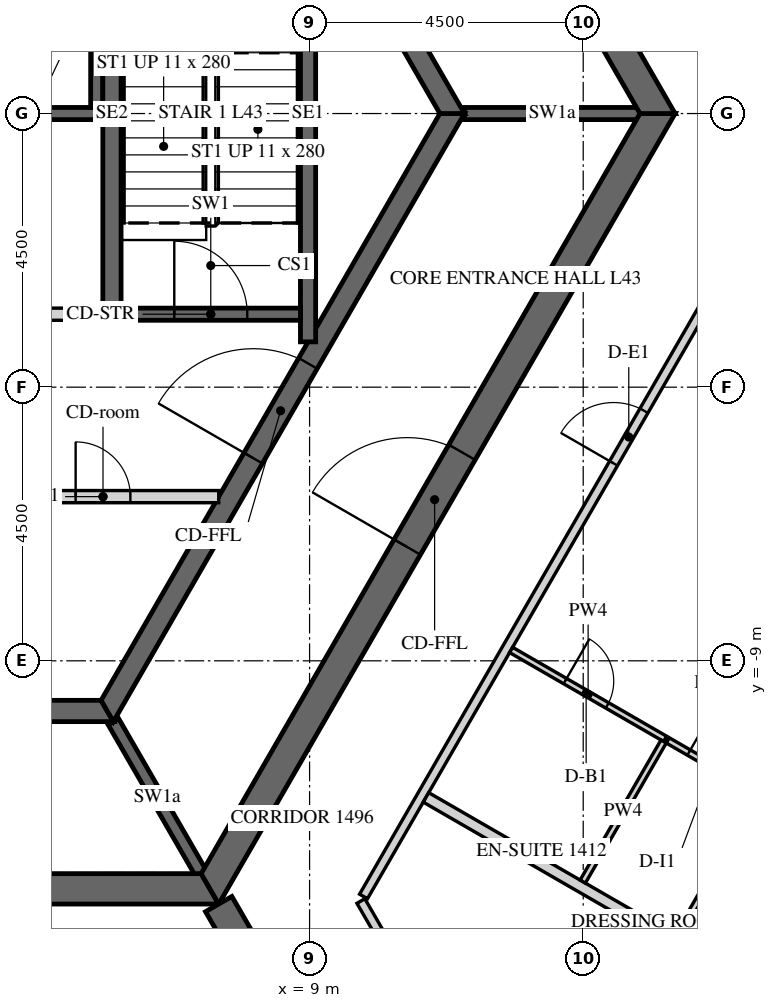
"""IFC4 building model, lengths in metres.
Left out: names, types, materials, properties, quantities, classifications, styles, units other than length and angle.
Written with IfcOpenShell. Run it as: python <this file> out.ifc"""

import sys

from ifc_helpers import new_model, si_unit, direction, frame, frame_2d, origin, place, context, subcontext, project, spatial, polyline, rectangle, outline, extrude, element, fill, save


model = new_model("IFC4")
c1 = context("Model", 3, precision=1e-05, world=origin(), true_north=direction((0.0, 1.0)))
c2 = subcontext(c1, "Body", "Model", "MODEL_VIEW")
j1 = project(units=[si_unit("LENGTHUNIT", "METRE"), si_unit("PLANEANGLEUNIT", "RADIAN")], contexts=[c1])
p1 = place(None, origin())
s1 = spatial("IfcSite", under=j1, at=p1, CompositionType="ELEMENT")
p2 = place(p1, origin())
s2 = spatial("IfcBuilding", under=s1, at=p2, CompositionType="ELEMENT")
p3 = place(p2, frame((0.0, 0.0, 183.9)))
s3 = spatial("IfcBuildingStorey", under=s2, at=p3, CompositionType="ELEMENT", Elevation=183.9)
p4 = place(p3, frame((-7.361, -12.75, -0.15), z_axis=(0.0, 0.0, 1.0), x_axis=(1.0, 0.0, 0.0)))
e1 = element("IfcWall", 1, at=p4, inside=s3, PredefinedType="SHEAR", context=c2, shape_type="SweptSolid", body=[
    extrude(outline(polyline([(-0.144, -0.25), (14.866, -0.25), (14.578, 0.25), (0.144, 0.25), (-0.144, -0.25)])), origin(), (0.0, 0.0, 1.0), 3.9),
])
p5 = place(p4, frame((6.761, 0.0, 0.15)))
e2 = element("IfcOpeningElement", 2, at=p5, cuts=e1, PredefinedType="OPENING", context=c2, shape_type="SweptSolid", body=[
    extrude(rectangle(XDim=1.2, YDim=2.4, at=frame_2d((0.6, 1.2))), frame((0.0, 0.26, 0.0), z_axis=(0.0, -1.0, 0.0), x_axis=(1.0, 0.0, 0.0)), (0.0, 0.0, 1.0), 0.52),
])
p6 = place(p3, frame((7.361, -12.75, -0.15), z_axis=(0.0, 0.0, 1.0), x_axis=(0.50000571537, 0.866022103989, 0.0)))
e3 = element("IfcWall", 3, at=p6, inside=s3, PredefinedType="SHEAR", context=c2, shape_type="SweptSolid", body=[
    extrude(outline(polyline([(-0.144, -0.25), (14.867, -0.25), (14.578, 0.25), (0.144, 0.25), (-0.144, -0.25)])), origin(), (0.0, 0.0, 1.0), 3.9),
])
p7 = place(p6, frame((6.49, 0.0, 0.15)))
e4 = element("IfcOpeningElement", 4, at=p7, cuts=e3, PredefinedType="OPENING", context=c2, shape_type="SweptSolid", body=[
    extrude(rectangle(XDim=1.8, YDim=2.4, at=frame_2d((0.9, 1.2))), frame((0.0, 0.26, 0.0), z_axis=(0.0, -1.0, 0.0), x_axis=(1.0, 0.0, 0.0)), (0.0, 0.0, 1.0), 0.52),
])
p8 = place(p3, frame((14.722, 0.0, -0.15), z_axis=(0.0, 0.0, 1.0), x_axis=(-0.50000571537, 0.866022103989, 0.0)))
e5 = element("IfcWall", 5, at=p8, inside=s3, PredefinedType="SHEAR", context=c2, shape_type="SweptSolid", body=[
    extrude(outline(polyline([(-0.144, -0.25), (14.867, -0.25), (14.578, 0.25), (0.144, 0.25), (-0.144, -0.25)])), origin(), (0.0, 0.0, 1.0), 3.9),
])
p9 = place(p8, frame((6.432, 0.0, 0.15)))
e6 = element("IfcOpeningElement", 6, at=p9, cuts=e5, PredefinedType="OPENING", context=c2, shape_type="SweptSolid", body=[
    extrude(rectangle(XDim=1.8, YDim=2.4, at=frame_2d((0.9, 1.2))), frame((0.0, 0.26, 0.0), z_axis=(0.0, -1.0, 0.0), x_axis=(1.0, 0.0, 0.0)), (0.0, 0.0, 1.0), 0.52),
])
p10 = place(p3, frame((7.506, -13.0, -0.15), z_axis=(0.0, 0.0, 1.0), x_axis=(0.499988271576, -0.866032175087, 0.0)))
e7 = element("IfcWall", 7, at=p10, inside=s3, PredefinedType="SHEAR", context=c2, shape_type="SweptSolid", body=[
    extrude(rectangle(XDim=15.424, YDim=0.5, at=frame_2d((7.712, 0.0))), origin(), (0.0, 0.0, 1.0), 3.9),
])
p11 = place(p10, frame((6.812, 0.0, 0.15)))
e8 = element("IfcOpeningElement", 8, at=p11, cuts=e7, PredefinedType="OPENING", context=c2, shape_type="SweptSolid", body=[
    extrude(rectangle(XDim=1.8, YDim=2.4, at=frame_2d((0.9, 1.2))), frame((0.0, 0.26, 0.0), z_axis=(0.0, -1.0, 0.0), x_axis=(1.0, 0.0, 0.0)), (0.0, 0.0, 1.0), 0.52),
])
p12 = place(p3, frame((-5.673, -9.825, -0.15), z_axis=(0.0, 0.0, 1.0), x_axis=(1.0, 0.0, 0.0)))
e9 = element("IfcWall", 9, at=p12, inside=s3, PredefinedType="SHEAR", context=c2, shape_type="SweptSolid", body=[
    extrude(outline(polyline([(-0.101, -0.175), (11.446, -0.175), (11.244, 0.175), (0.101, 0.175), (-0.101, -0.175)])), origin(), (0.0, 0.0, 1.0), 3.9),
])
p13 = place(p3, frame((5.673, -9.825, -0.15), z_axis=(0.0, 0.0, 1.0), x_axis=(0.499995046907, 0.866028263435, 0.0)))
e10 = element("IfcWall", 10, at=p13, inside=s3, PredefinedType="SHEAR", context=c2, shape_type="SweptSolid", body=[
    extrude(outline(polyline([(-0.101, -0.175), (11.446, -0.175), (11.244, 0.175), (0.101, 0.175), (-0.101, -0.175)])), origin(), (0.0, 0.0, 1.0), 3.9),
])
p14 = place(p13, frame((4.801, 0.0, 0.15)))
e11 = element("IfcOpeningElement", 11, at=p14, cuts=e10, PredefinedType="OPENING", context=c2, shape_type="SweptSolid", body=[
    extrude(rectangle(XDim=1.8, YDim=2.4, at=frame_2d((0.9, 1.2))), frame((0.0, 0.185, 0.0), z_axis=(0.0, -1.0, 0.0), x_axis=(1.0, 0.0, 0.0)), (0.0, 0.0, 1.0), 0.37),
])
p15 = place(p3, frame((11.345, 0.0, -0.15), z_axis=(0.0, 0.0, 1.0), x_axis=(-0.499995046907, 0.866028263435, 0.0)))
e12 = element("IfcWall", 12, at=p15, inside=s3, PredefinedType="SHEAR", context=c2, shape_type="SweptSolid", body=[
    extrude(outline(polyline([(-0.101, -0.175), (11.446, -0.175), (11.244, 0.175), (0.101, 0.175), (-0.101, -0.175)])), origin(), (0.0, 0.0, 1.0), 3.9),
])
p16 = place(p15, frame((4.744, 0.0, 0.15)))
e13 = element("IfcOpeningElement", 13, at=p16, cuts=e12, PredefinedType="OPENING", context=c2, shape_type="SweptSolid", body=[
    extrude(rectangle(XDim=1.8, YDim=2.4, at=frame_2d((0.9, 1.2))), frame((0.0, 0.185, 0.0), z_axis=(0.0, -1.0, 0.0), x_axis=(1.0, 0.0, 0.0)), (0.0, 0.0, 1.0), 0.37),
])
p17 = place(p3, frame((-5.6, 0.0, -0.25), z_axis=(0.0, 0.0, 1.0), x_axis=(1.0, 0.0, 0.0)))
e14 = element("IfcWall", 14, at=p17, inside=s3, PredefinedType="SHEAR", context=c2, shape_type="SweptSolid", body=[
    extrude(rectangle(XDim=11.2, YDim=0.2, at=frame_2d((5.6, 0.0))), origin(), (0.0, 0.0, 1.0), 3.9),
])
p18 = place(p3, frame((5.5, 0.1, -0.25), z_axis=(0.0, 0.0, 1.0), x_axis=(0.0, 1.0, 0.0)))
e15 = element("IfcWall", 15, at=p18, inside=s3, PredefinedType="SHEAR", context=c2, shape_type="SweptSolid", body=[
    extrude(rectangle(XDim=3.1, YDim=0.2, at=frame_2d((1.55, 0.0))), origin(), (0.0, 0.0, 1.0), 3.9),
])
p19 = place(p3, frame((0.1, -3.3, 0.0), z_axis=(0.0, 0.0, 1.0), x_axis=(1.0, 0.0, 0.0)))
e16 = element("IfcWall", 16, at=p19, inside=s3, PredefinedType="PARTITIONING", context=c2, shape_type="SweptSolid", body=[
    extrude(rectangle(XDim=5.5, YDim=0.2, at=frame_2d((2.75, 0.0))), origin(), (0.0, 0.0, 1.0), 3.65),
])
p20 = place(p19, frame((2.3, 0.0, 0.0)))
e17 = element("IfcOpeningElement", 17, at=p20, cuts=e16, PredefinedType="OPENING", context=c2, shape_type="SweptSolid", body=[
    extrude(rectangle(XDim=0.9, YDim=2.1, at=frame_2d((0.45, 1.05))), frame((0.0, 0.11, 0.0), z_axis=(0.0, -1.0, 0.0), x_axis=(1.0, 0.0, 0.0)), (0.0, 0.0, 1.0), 0.22),
])
p21 = place(p3, frame((3.7, -6.3, 0.0), z_axis=(0.0, 0.0, 1.0), x_axis=(1.0, 0.0, 0.0)))
e18 = element("IfcWall", 18, at=p21, inside=s3, PredefinedType="PARTITIONING", context=c2, shape_type="SweptSolid", body=[
    extrude(rectangle(XDim=3.806, YDim=0.2, at=frame_2d((1.903, 0.0))), origin(), (0.0, 0.0, 1.0), 3.65),
])
p22 = place(p21, frame((1.453, 0.0, 0.0)))
e19 = element("IfcOpeningElement", 19, at=p22, cuts=e18, PredefinedType="OPENING", context=c2, shape_type="SweptSolid", body=[
    extrude(rectangle(XDim=0.9, YDim=2.1, at=frame_2d((0.45, 1.05))), frame((0.0, 0.11, 0.0), z_axis=(0.0, -1.0, 0.0), x_axis=(1.0, 0.0, 0.0)), (0.0, 0.0, 1.0), 0.22),
])
for number, where, z_axis, x_axis in (
    (20, (11.547, 0.0, -0.15), (0.0, 0.0, 1.0), (1.0, 0.0, 0.0)),
    (21, (5.773, -10.0, -0.15), (0.0, 0.0, 1.0), (0.5, -0.866, 0.0)),
):
    element("IfcWall", number, at=place(p3, frame(where, z_axis=z_axis, x_axis=x_axis)), inside=s3, PredefinedType="SHEAR", context=c2, shape_type="SweptSolid", body=[
        extrude(rectangle(XDim=2.887, YDim=0.2, at=frame_2d((1.443, 0.0))), origin(), (0.0, 0.0, 1.0), 3.9),
    ])
p23 = place(p3, frame((5.75, -3.4, -0.25), z_axis=(0.0, 0.0, 1.0), x_axis=(0.0, 1.0, 0.0)))
e22 = element("IfcWall", 22, at=p23, inside=s3, PredefinedType="SHEAR", context=c2, shape_type="SweptSolid", body=[
    extrude(rectangle(XDim=6.8, YDim=0.3, at=frame_2d((3.4, 0.0))), origin(), (0.0, 0.0, 1.0), 3.9),
])
p24 = place(p3, frame((8.975, -3.755, -0.25), z_axis=(0.0, 0.0, 1.0), x_axis=(0.0, 1.0, 0.0)))
e23 = element("IfcWall", 23, at=p24, inside=s3, PredefinedType="SHEAR", context=c2, shape_type="SweptSolid", body=[
    extrude(rectangle(XDim=7.51, YDim=0.25, at=frame_2d((3.755, 0.0))), origin(), (0.0, 0.0, 1.0), 3.9),
])
p25 = place(p3, frame((5.9, -3.3, -0.25), z_axis=(0.0, 0.0, 1.0), x_axis=(1.0, 0.0, 0.0)))
e24 = element("IfcWall", 24, at=p25, inside=s3, PredefinedType="SHEAR", context=c2, shape_type="SweptSolid", body=[
    extrude(rectangle(XDim=2.95, YDim=0.2, at=frame_2d((1.475, 0.0))), origin(), (0.0, 0.0, 1.0), 3.9),
])
p26 = place(p25, frame((0.875, 0.0, 0.25)))
e25 = element("IfcOpeningElement", 25, at=p26, cuts=e24, PredefinedType="OPENING", context=c2, shape_type="SweptSolid", body=[
    extrude(rectangle(XDim=1.2, YDim=2.4, at=frame_2d((0.6, 1.2))), frame((0.0, 0.11, 0.0), z_axis=(0.0, -1.0, 0.0), x_axis=(1.0, 0.0, 0.0)), (0.0, 0.0, 1.0), 0.22),
])
p27 = place(p3, frame((13.699, -19.628, 0.0), z_axis=(0.0, 0.0, 1.0), x_axis=(-0.499993780622, 0.866028994514, 0.0)))
e26 = element("IfcWall", 26, at=p27, inside=s3, PredefinedType="PARTITIONING", context=c2, shape_type="SweptSolid", body=[
    extrude(rectangle(XDim=7.711, YDim=0.15, at=frame_2d((3.855, 0.0))), origin(), (0.0, 0.0, 1.0), 2.988),
])
p28 = place(p27, frame((4.718, 0.0, 0.0)))
e27 = element("IfcOpeningElement", 27, at=p28, cuts=e26, PredefinedType="OPENING", context=c2, shape_type="SweptSolid", body=[
    extrude(rectangle(XDim=1.0, YDim=2.1, at=frame_2d((0.5, 1.05))), frame((0.0, 0.085, 0.0), z_axis=(0.0, -1.0, 0.0), x_axis=(1.0, 0.0, 0.0)), (0.0, 0.0, 1.0), 0.17),
])
p29 = place(p3, frame((9.887, -12.875, 0.0), z_axis=(0.0, 0.0, 1.0), x_axis=(0.499998228944, 0.866026426302, 0.0)))
e28 = element("IfcWall", 28, at=p29, inside=s3, PredefinedType="PARTITIONING", context=c2, shape_type="SweptSolid", body=[
    extrude(rectangle(XDim=14.867, YDim=0.15, at=frame_2d((7.433, 0.0))), origin(), (0.0, 0.0, 1.0), 2.988),
])
p30 = place(p29, frame((8.224, 0.0, 0.0)))
e29 = element("IfcOpeningElement", 29, at=p30, cuts=e28, PredefinedType="OPENING", context=c2, shape_type="SweptSolid", body=[
    extrude(rectangle(XDim=1.0, YDim=2.1, at=frame_2d((0.5, 1.05))), frame((0.0, 0.085, 0.0), z_axis=(0.0, -1.0, 0.0), x_axis=(1.0, 0.0, 0.0)), (0.0, 0.0, 1.0), 0.17),
])
p31 = place(p29, frame((13.717, 0.0, 0.0)))
e30 = element("IfcOpeningElement", 30, at=p31, cuts=e28, PredefinedType="OPENING", context=c2, shape_type="SweptSolid", body=[
    extrude(rectangle(XDim=1.0, YDim=2.1, at=frame_2d((0.5, 1.05))), frame((0.0, 0.085, 0.0), z_axis=(0.0, -1.0, 0.0), x_axis=(1.0, 0.0, 0.0)), (0.0, 0.0, 1.0), 0.17),
])
p32 = place(p3, frame((17.277, 0.075, 0.0), z_axis=(0.0, 0.0, 1.0), x_axis=(-0.499998228944, 0.866026426302, 0.0)))
e31 = element("IfcWall", 31, at=p32, inside=s3, PredefinedType="PARTITIONING", context=c2, shape_type="SweptSolid", body=[
    extrude(rectangle(XDim=14.867, YDim=0.15, at=frame_2d((7.433, 0.0))), origin(), (0.0, 0.0, 1.0), 2.988),
])
p33 = place(p32, frame((9.398, 0.0, 0.0)))
e32 = element("IfcOpeningElement", 32, at=p33, cuts=e31, PredefinedType="OPENING", context=c2, shape_type="SweptSolid", body=[
    extrude(rectangle(XDim=1.0, YDim=2.1, at=frame_2d((0.5, 1.05))), frame((0.0, 0.085, 0.0), z_axis=(0.0, -1.0, 0.0), x_axis=(1.0, 0.0, 0.0)), (0.0, 0.0, 1.0), 0.17),
])
p34 = place(p3, frame((21.631, -17.433, 0.0), z_axis=(0.0, 0.0, 1.0), x_axis=(-0.866024931941, 0.500000817256, 0.0)))
e33 = element("IfcWall", 33, at=p34, inside=s3, PredefinedType="PARTITIONING", context=c2, shape_type="SweptSolid", body=[
    extrude(rectangle(XDim=12.375, YDim=0.18, at=frame_2d((6.188, 0.0))), origin(), (0.0, 0.0, 1.0), 2.988),
])
p35 = place(p3, frame((12.314, -8.821, 0.0), z_axis=(0.0, 0.0, 1.0), x_axis=(0.866046596414, -0.499963291492, 0.0)))
e34 = element("IfcWall", 34, at=p35, inside=s3, PredefinedType="PARTITIONING", context=c2, shape_type="SweptSolid", body=[
    extrude(rectangle(XDim=2.925, YDim=0.1, at=frame_2d((1.462, 0.0))), origin(), (0.0, 0.0, 1.0), 2.988),
])
p36 = place(p35, frame((1.025, 0.0, 0.0)))
e35 = element("IfcOpeningElement", 35, at=p36, cuts=e34, PredefinedType="OPENING", context=c2, shape_type="SweptSolid", body=[
    extrude(rectangle(XDim=0.8, YDim=2.1, at=frame_2d((0.4, 1.05))), frame((0.0, 0.06, 0.0), z_axis=(0.0, -1.0, 0.0), x_axis=(1.0, 0.0, 0.0)), (0.0, 0.0, 1.0), 0.12),
])
p37 = place(p3, frame((14.891, -10.309, 0.0), z_axis=(0.0, 0.0, 1.0), x_axis=(0.866036909293, -0.499980071345, 0.0)))
e36 = element("IfcWall", 36, at=p37, inside=s3, PredefinedType="PARTITIONING", context=c2, shape_type="SweptSolid", body=[
    extrude(rectangle(XDim=1.75, YDim=0.1, at=frame_2d((0.875, 0.0))), origin(), (0.0, 0.0, 1.0), 2.988),
])
p38 = place(p37, frame((0.4, 0.0, 0.0)))
e37 = element("IfcOpeningElement", 37, at=p38, cuts=e36, PredefinedType="OPENING", context=c2, shape_type="SweptSolid", body=[
    extrude(rectangle(XDim=0.9, YDim=2.1, at=frame_2d((0.45, 1.05))), frame((0.0, 0.06, 0.0), z_axis=(0.0, -1.0, 0.0), x_axis=(1.0, 0.0, 0.0)), (0.0, 0.0, 1.0), 0.12),
])
p39 = place(p3, frame((16.381, -11.227, 0.0), z_axis=(0.0, 0.0, 1.0), x_axis=(-0.500008456887, -0.866020521143, 0.0)))
e38 = element("IfcWall", 38, at=p39, inside=s3, PredefinedType="PARTITIONING", context=c2, shape_type="SweptSolid", body=[
    extrude(rectangle(XDim=2.66, YDim=0.1, at=frame_2d((1.33, 0.0))), origin(), (0.0, 0.0, 1.0), 2.988),
])
p40 = place(p3, frame((13.492, -12.63, 0.0), z_axis=(0.0, 0.0, 1.0), x_axis=(0.50004820116, 0.865997573043, 0.0)))
e39 = element("IfcWall", 39, at=p40, inside=s3, PredefinedType="PARTITIONING", context=c2, shape_type="SweptSolid", body=[
    extrude(rectangle(XDim=2.66, YDim=0.1, at=frame_2d((1.33, 0.0))), origin(), (0.0, 0.0, 1.0), 2.988),
])
p41 = place(p7, origin())
e40 = element("IfcDoor", 40, at=p41, inside=s3, OperationType="DOUBLE_DOOR_SINGLE_SWING", PredefinedType="DOOR", context=c2, shape_type="SweptSolid", body=[
    extrude(rectangle(XDim=1.8, YDim=2.4, at=frame_2d((0.9, 1.2))), frame((0.0, 0.025, 0.0), z_axis=(0.0, -1.0, 0.0), x_axis=(1.0, 0.0, 0.0)), (0.0, 0.0, 1.0), 0.05),
])
fill(e4, e40)
p42 = place(p14, origin())
e41 = element("IfcDoor", 41, at=p42, inside=s3, OperationType="DOUBLE_DOOR_SINGLE_SWING", PredefinedType="DOOR", context=c2, shape_type="SweptSolid", body=[
    extrude(rectangle(XDim=1.8, YDim=2.4, at=frame_2d((0.9, 1.2))), frame((0.0, 0.025, 0.0), z_axis=(0.0, -1.0, 0.0), x_axis=(1.0, 0.0, 0.0)), (0.0, 0.0, 1.0), 0.05),
])
fill(e11, e41)
p43 = place(p22, origin())
e42 = element("IfcDoor", 42, at=p43, inside=s3, OperationType="SINGLE_SWING_LEFT", PredefinedType="DOOR", context=c2, shape_type="SweptSolid", body=[
    extrude(rectangle(XDim=0.9, YDim=2.1, at=frame_2d((0.45, 1.05))), frame((0.0, 0.025, 0.0), z_axis=(0.0, -1.0, 0.0), x_axis=(1.0, 0.0, 0.0)), (0.0, 0.0, 1.0), 0.05),
])
fill(e19, e42)
p44 = place(p26, origin())
e43 = element("IfcDoor", 43, at=p44, inside=s3, OperationType="SINGLE_SWING_LEFT", PredefinedType="DOOR", context=c2, shape_type="SweptSolid", body=[
    extrude(rectangle(XDim=1.2, YDim=2.4, at=frame_2d((0.6, 1.2))), frame((0.0, 0.025, 0.0), z_axis=(0.0, -1.0, 0.0), x_axis=(1.0, 0.0, 0.0)), (0.0, 0.0, 1.0), 0.05),
])
fill(e25, e43)
p45 = place(p30, origin())
e44 = element("IfcDoor", 44, at=p45, inside=s3, OperationType="SINGLE_SWING_LEFT", PredefinedType="DOOR", context=c2, shape_type="SweptSolid", body=[
    extrude(rectangle(XDim=1.0, YDim=2.1, at=frame_2d((0.5, 1.05))), frame((0.0, 0.025, 0.0), z_axis=(0.0, -1.0, 0.0), x_axis=(1.0, 0.0, 0.0)), (0.0, 0.0, 1.0), 0.05),
])
fill(e29, e44)
p46 = place(p36, origin())
e45 = element("IfcDoor", 45, at=p46, inside=s3, OperationType="SINGLE_SWING_RIGHT", PredefinedType="DOOR", context=c2, shape_type="SweptSolid", body=[
    extrude(rectangle(XDim=0.8, YDim=2.1, at=frame_2d((0.4, 1.05))), frame((0.0, 0.025, 0.0), z_axis=(0.0, -1.0, 0.0), x_axis=(1.0, 0.0, 0.0)), (0.0, 0.0, 1.0), 0.05),
])
fill(e35, e45)
p47 = place(p38, origin())
e46 = element("IfcDoor", 46, at=p47, inside=s3, OperationType="SINGLE_SWING_RIGHT", PredefinedType="DOOR", context=c2, shape_type="SweptSolid", body=[
    extrude(rectangle(XDim=0.9, YDim=2.1, at=frame_2d((0.45, 1.05))), frame((0.0, 0.025, 0.0), z_axis=(0.0, -1.0, 0.0), x_axis=(1.0, 0.0, 0.0)), (0.0, 0.0, 1.0), 0.05),
])
fill(e37, e46)
save(model, sys.argv[1])
